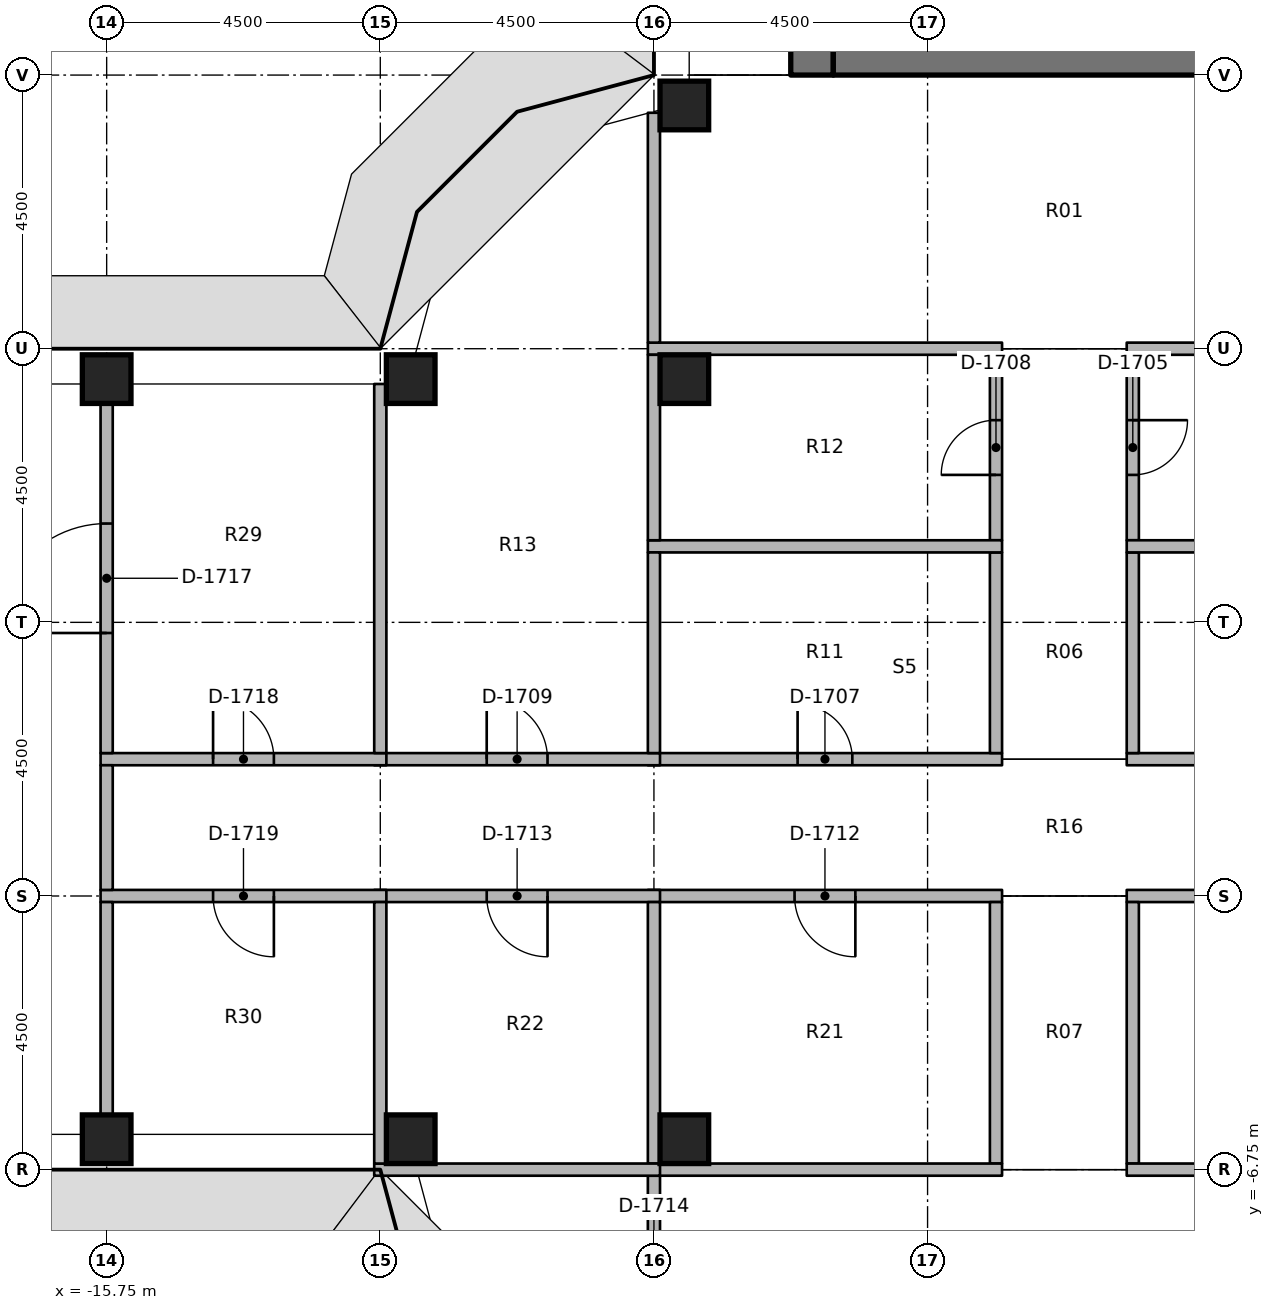
"""IFC4 building model, lengths in metres.
Left out: names, types, materials, properties, quantities, classifications, styles, units other than length and angle.
Written with IfcOpenShell. Run it as: python <this file> out.ifc"""

import sys

from ifc_helpers import new_model, si_unit, direction, frame, frame_2d, origin, origin_2d, place, context, subcontext, project, spatial, rectangle, extrude, element, fill, save


model = new_model("IFC4")
c1 = context("Model", 3, precision=1e-05, world=origin(), true_north=direction((0.0, 1.0)))
c2 = subcontext(c1, "Body", "Model", "MODEL_VIEW")
j1 = project(units=[si_unit("LENGTHUNIT", "METRE"), si_unit("PLANEANGLEUNIT", "RADIAN")], contexts=[c1])
p1 = place(None, origin())
s1 = spatial("IfcSite", under=j1, at=p1, CompositionType="ELEMENT")
p2 = place(p1, origin())
s2 = spatial("IfcBuilding", under=s1, at=p2, CompositionType="ELEMENT")
p3 = place(p2, frame((0.0, 0.0, 160.0)))
s3 = spatial("IfcBuildingStorey", under=s2, at=p3, CompositionType="ELEMENT", Elevation=160.0)
for number, where, z_axis, x_axis in (
    (1, (-15.75, -6.25, 0.0), (0.0, 0.0, 1.0), (1.0, 0.0, 0.0)),
    (2, (-15.75, 6.25, 0.0), (0.0, 0.0, 1.0), (1.0, 0.0, 0.0)),
    (3, (-10.75, -6.25, 0.0), (0.0, 0.0, 1.0), (1.0, 0.0, 0.0)),
    (4, (-10.75, 6.25, 0.0), (0.0, 0.0, 1.0), (1.0, 0.0, 0.0)),
    (5, (-6.25, -6.25, 0.0), (0.0, 0.0, 1.0), (1.0, 0.0, 0.0)),
    (6, (-6.25, 6.25, 0.0), (0.0, 0.0, 1.0), (1.0, 0.0, 0.0)),
    (7, (-6.25, 10.75, 0.0), (0.0, 0.0, 1.0), (1.0, 0.0, 0.0)),
):
    element("IfcColumn", number, at=place(p3, frame(where, z_axis=z_axis, x_axis=x_axis)), inside=s3, PredefinedType="COLUMN", context=c2, shape_type="SweptSolid", body=[
        extrude(rectangle(XDim=0.8, YDim=0.8, at=origin_2d()), origin(), (0.0, 0.0, 1.0), 3.65),
    ])
p4 = place(p3, frame((-4.15, 11.25, 0.0), z_axis=(0.0, 0.0, 1.0), x_axis=(0.0, 1.0, 0.0)))
e8 = element("IfcWall", 8, at=p4, inside=s3, PredefinedType="SHEAR", context=c2, shape_type="SweptSolid", body=[
    extrude(rectangle(XDim=15.0, YDim=0.7, at=frame_2d((7.5, 0.0))), origin(), (0.0, 0.0, 1.0), 3.8),
])
p5 = place(p4, frame((7.15, 0.0, 0.0)))
e9 = element("IfcOpeningElement", 9, at=p5, cuts=e8, PredefinedType="OPENING", context=c2, shape_type="SweptSolid", body=[
    extrude(rectangle(XDim=1.5, YDim=2.3, at=frame_2d((0.75, 1.15))), frame((0.0, 0.36, 0.0), z_axis=(0.0, -1.0, 0.0), x_axis=(1.0, 0.0, 0.0)), (0.0, 0.0, 1.0), 0.72),
])
p6 = place(p4, frame((13.9, 0.0, 0.0)))
e10 = element("IfcOpeningElement", 10, at=p6, cuts=e8, PredefinedType="OPENING", context=c2, shape_type="SweptSolid", body=[
    extrude(rectangle(XDim=0.9, YDim=2.1, at=frame_2d((0.45, 1.05))), frame((0.0, 0.36, 0.0), z_axis=(0.0, -1.0, 0.0), x_axis=(1.0, 0.0, 0.0)), (0.0, 0.0, 1.0), 0.72),
])
p7 = place(p4, frame((1.15, 0.0, 0.0)))
e11 = element("IfcOpeningElement", 11, at=p7, cuts=e8, PredefinedType="OPENING", context=c2, shape_type="SweptSolid", body=[
    extrude(rectangle(XDim=1.2, YDim=2.1, at=frame_2d((0.6, 1.05))), frame((0.0, 0.36, 0.0), z_axis=(0.0, -1.0, 0.0), x_axis=(1.0, 0.0, 0.0)), (0.0, 0.0, 1.0), 0.72),
])
p8 = place(p3, frame((-3.8, 11.6, 0.0), z_axis=(0.0, 0.0, 1.0), x_axis=(1.0, 0.0, 0.0)))
e12 = element("IfcWall", 12, at=p8, inside=s3, PredefinedType="SHEAR", context=c2, shape_type="SweptSolid", body=[
    extrude(rectangle(XDim=7.6, YDim=0.7, at=frame_2d((3.8, 0.0))), origin(), (0.0, 0.0, 1.0), 3.8),
])
p9 = place(p3, frame((1.025, 0.0, 0.0), z_axis=(0.0, 0.0, 1.0), x_axis=(1.0, 0.0, 0.0)))
e13 = element("IfcWall", 13, at=p9, inside=s3, PredefinedType="PARTITIONING", context=c2, shape_type="SweptSolid", body=[
    extrude(rectangle(XDim=5.825, YDim=0.2, at=frame_2d((2.913, 0.0))), origin(), (0.0, 0.0, 1.0), 2.75),
])
p10 = place(p9, frame((2.462, 0.0, 0.0)))
e14 = element("IfcOpeningElement", 14, at=p10, cuts=e13, PredefinedType="OPENING", context=c2, shape_type="SweptSolid", body=[
    extrude(rectangle(XDim=0.9, YDim=2.1, at=frame_2d((0.45, 1.05))), frame((0.0, 0.11, 0.0), z_axis=(0.0, -1.0, 0.0), x_axis=(1.0, 0.0, 0.0)), (0.0, 0.0, 1.0), 0.22),
])
p11 = place(p3, frame((-6.85, 0.0, 0.0), z_axis=(0.0, 0.0, 1.0), x_axis=(1.0, 0.0, 0.0)))
e15 = element("IfcWall", 15, at=p11, inside=s3, PredefinedType="PARTITIONING", context=c2, shape_type="SweptSolid", body=[
    extrude(rectangle(XDim=5.825, YDim=0.2, at=frame_2d((2.913, 0.0))), origin(), (0.0, 0.0, 1.0), 2.75),
])
p12 = place(p11, frame((2.462, 0.0, 0.0)))
e16 = element("IfcOpeningElement", 16, at=p12, cuts=e15, PredefinedType="OPENING", context=c2, shape_type="SweptSolid", body=[
    extrude(rectangle(XDim=0.9, YDim=2.1, at=frame_2d((0.45, 1.05))), frame((0.0, 0.11, 0.0), z_axis=(0.0, -1.0, 0.0), x_axis=(1.0, 0.0, 0.0)), (0.0, 0.0, 1.0), 0.22),
])
p13 = place(p3, frame((-11.35, 0.0, 0.0), z_axis=(0.0, 0.0, 1.0), x_axis=(1.0, 0.0, 0.0)))
e17 = element("IfcWall", 17, at=p13, inside=s3, PredefinedType="PARTITIONING", context=c2, shape_type="SweptSolid", body=[
    extrude(rectangle(XDim=4.7, YDim=0.2, at=frame_2d((2.35, 0.0))), origin(), (0.0, 0.0, 1.0), 2.75),
])
p14 = place(p13, frame((1.85, 0.0, 0.0)))
e18 = element("IfcOpeningElement", 18, at=p14, cuts=e17, PredefinedType="OPENING", context=c2, shape_type="SweptSolid", body=[
    extrude(rectangle(XDim=1.0, YDim=2.1, at=frame_2d((0.5, 1.05))), frame((0.0, 0.11, 0.0), z_axis=(0.0, -1.0, 0.0), x_axis=(1.0, 0.0, 0.0)), (0.0, 0.0, 1.0), 0.22),
])
p15 = place(p3, frame((6.85, -2.25, 0.0), z_axis=(0.0, 0.0, 1.0), x_axis=(-1.0, 0.0, 0.0)))
e19 = element("IfcWall", 19, at=p15, inside=s3, PredefinedType="PARTITIONING", context=c2, shape_type="SweptSolid", body=[
    extrude(rectangle(XDim=5.825, YDim=0.2, at=frame_2d((2.913, 0.0))), origin(), (0.0, 0.0, 1.0), 2.75),
])
p16 = place(p15, frame((2.413, 0.0, 0.0)))
e20 = element("IfcOpeningElement", 20, at=p16, cuts=e19, PredefinedType="OPENING", context=c2, shape_type="SweptSolid", body=[
    extrude(rectangle(XDim=1.0, YDim=2.1, at=frame_2d((0.5, 1.05))), frame((0.0, 0.11, 0.0), z_axis=(0.0, -1.0, 0.0), x_axis=(1.0, 0.0, 0.0)), (0.0, 0.0, 1.0), 0.22),
])
p17 = place(p3, frame((-1.025, -2.25, 0.0), z_axis=(0.0, 0.0, 1.0), x_axis=(-1.0, 0.0, 0.0)))
e21 = element("IfcWall", 21, at=p17, inside=s3, PredefinedType="PARTITIONING", context=c2, shape_type="SweptSolid", body=[
    extrude(rectangle(XDim=5.825, YDim=0.2, at=frame_2d((2.913, 0.0))), origin(), (0.0, 0.0, 1.0), 2.75),
])
p18 = place(p17, frame((2.413, 0.0, 0.0)))
e22 = element("IfcOpeningElement", 22, at=p18, cuts=e21, PredefinedType="OPENING", context=c2, shape_type="SweptSolid", body=[
    extrude(rectangle(XDim=1.0, YDim=2.1, at=frame_2d((0.5, 1.05))), frame((0.0, 0.11, 0.0), z_axis=(0.0, -1.0, 0.0), x_axis=(1.0, 0.0, 0.0)), (0.0, 0.0, 1.0), 0.22),
])
p19 = place(p3, frame((-6.65, -2.25, 0.0), z_axis=(0.0, 0.0, 1.0), x_axis=(-1.0, 0.0, 0.0)))
e23 = element("IfcWall", 23, at=p19, inside=s3, PredefinedType="PARTITIONING", context=c2, shape_type="SweptSolid", body=[
    extrude(rectangle(XDim=4.7, YDim=0.2, at=frame_2d((2.35, 0.0))), origin(), (0.0, 0.0, 1.0), 2.75),
])
p20 = place(p19, frame((1.85, 0.0, 0.0)))
e24 = element("IfcOpeningElement", 24, at=p20, cuts=e23, PredefinedType="OPENING", context=c2, shape_type="SweptSolid", body=[
    extrude(rectangle(XDim=1.0, YDim=2.1, at=frame_2d((0.5, 1.05))), frame((0.0, 0.11, 0.0), z_axis=(0.0, -1.0, 0.0), x_axis=(1.0, 0.0, 0.0)), (0.0, 0.0, 1.0), 0.22),
])
p21 = place(p3, frame((-15.85, 0.0, 0.0), z_axis=(0.0, 0.0, 1.0), x_axis=(1.0, 0.0, 0.0)))
e25 = element("IfcWall", 25, at=p21, inside=s3, PredefinedType="PARTITIONING", context=c2, shape_type="SweptSolid", body=[
    extrude(rectangle(XDim=4.7, YDim=0.2, at=frame_2d((2.35, 0.0))), origin(), (0.0, 0.0, 1.0), 2.75),
])
p22 = place(p21, frame((1.85, 0.0, 0.0)))
e26 = element("IfcOpeningElement", 26, at=p22, cuts=e25, PredefinedType="OPENING", context=c2, shape_type="SweptSolid", body=[
    extrude(rectangle(XDim=1.0, YDim=2.1, at=frame_2d((0.5, 1.05))), frame((0.0, 0.11, 0.0), z_axis=(0.0, -1.0, 0.0), x_axis=(1.0, 0.0, 0.0)), (0.0, 0.0, 1.0), 0.22),
])
p23 = place(p3, frame((-11.15, -2.25, 0.0), z_axis=(0.0, 0.0, 1.0), x_axis=(-1.0, 0.0, 0.0)))
e27 = element("IfcWall", 27, at=p23, inside=s3, PredefinedType="PARTITIONING", context=c2, shape_type="SweptSolid", body=[
    extrude(rectangle(XDim=4.7, YDim=0.2, at=frame_2d((2.35, 0.0))), origin(), (0.0, 0.0, 1.0), 2.75),
])
p24 = place(p23, frame((1.85, 0.0, 0.0)))
e28 = element("IfcOpeningElement", 28, at=p24, cuts=e27, PredefinedType="OPENING", context=c2, shape_type="SweptSolid", body=[
    extrude(rectangle(XDim=1.0, YDim=2.1, at=frame_2d((0.5, 1.05))), frame((0.0, 0.11, 0.0), z_axis=(0.0, -1.0, 0.0), x_axis=(1.0, 0.0, 0.0)), (0.0, 0.0, 1.0), 0.22),
])
p25 = place(p3, frame((-15.75, -2.15, 0.0), z_axis=(0.0, 0.0, 1.0), x_axis=(0.0, 1.0, 0.0)))
e29 = element("IfcWall", 29, at=p25, inside=s3, PredefinedType="PARTITIONING", context=c2, shape_type="SweptSolid", body=[
    extrude(rectangle(XDim=2.05, YDim=0.2, at=frame_2d((1.025, 0.0))), origin(), (0.0, 0.0, 1.0), 2.75),
])
p26 = place(p3, frame((1.125, 0.1, 0.0), z_axis=(0.0, 0.0, 1.0), x_axis=(0.0, 1.0, 0.0)))
e30 = element("IfcWall", 30, at=p26, inside=s3, PredefinedType="PARTITIONING", context=c2, shape_type="SweptSolid", body=[
    extrude(rectangle(XDim=3.3, YDim=0.2, at=frame_2d((1.65, 0.0))), origin(), (0.0, 0.0, 1.0), 2.75),
])
p27 = place(p3, frame((1.125, 6.65, 0.0), z_axis=(0.0, 0.0, 1.0), x_axis=(0.0, -1.0, 0.0)))
e31 = element("IfcWall", 31, at=p27, inside=s3, PredefinedType="PARTITIONING", context=c2, shape_type="SweptSolid", body=[
    extrude(rectangle(XDim=3.05, YDim=0.2, at=frame_2d((1.525, 0.0))), origin(), (0.0, 0.0, 1.0), 2.75),
])
p28 = place(p27, frame((1.075, 0.0, 0.0)))
e32 = element("IfcOpeningElement", 32, at=p28, cuts=e31, PredefinedType="OPENING", context=c2, shape_type="SweptSolid", body=[
    extrude(rectangle(XDim=0.9, YDim=2.1, at=frame_2d((0.45, 1.05))), frame((0.0, 0.11, 0.0), z_axis=(0.0, -1.0, 0.0), x_axis=(1.0, 0.0, 0.0)), (0.0, 0.0, 1.0), 0.22),
])
p29 = place(p3, frame((-1.125, 0.1, 0.0), z_axis=(0.0, 0.0, 1.0), x_axis=(0.0, 1.0, 0.0)))
e33 = element("IfcWall", 33, at=p29, inside=s3, PredefinedType="PARTITIONING", context=c2, shape_type="SweptSolid", body=[
    extrude(rectangle(XDim=3.3, YDim=0.2, at=frame_2d((1.65, 0.0))), origin(), (0.0, 0.0, 1.0), 2.75),
])
p30 = place(p3, frame((-1.125, 3.6, 0.0), z_axis=(0.0, 0.0, 1.0), x_axis=(0.0, 1.0, 0.0)))
e34 = element("IfcWall", 34, at=p30, inside=s3, PredefinedType="PARTITIONING", context=c2, shape_type="SweptSolid", body=[
    extrude(rectangle(XDim=3.05, YDim=0.2, at=frame_2d((1.525, 0.0))), origin(), (0.0, 0.0, 1.0), 2.75),
])
p31 = place(p30, frame((1.075, 0.0, 0.0)))
e35 = element("IfcOpeningElement", 35, at=p31, cuts=e34, PredefinedType="OPENING", context=c2, shape_type="SweptSolid", body=[
    extrude(rectangle(XDim=0.9, YDim=2.1, at=frame_2d((0.45, 1.05))), frame((0.0, 0.11, 0.0), z_axis=(0.0, -1.0, 0.0), x_axis=(1.0, 0.0, 0.0)), (0.0, 0.0, 1.0), 0.22),
])
for number, where, z_axis, x_axis in (
    (36, (1.125, -6.65, 0.0), (0.0, 0.0, 1.0), (0.0, 1.0, 0.0)),
    (37, (-1.125, -6.65, 0.0), (0.0, 0.0, 1.0), (0.0, 1.0, 0.0)),
):
    element("IfcWall", number, at=place(p3, frame(where, z_axis=z_axis, x_axis=x_axis)), inside=s3, PredefinedType="PARTITIONING", context=c2, shape_type="SweptSolid", body=[
        extrude(rectangle(XDim=4.3, YDim=0.2, at=frame_2d((2.15, 0.0))), origin(), (0.0, 0.0, 1.0), 2.75),
    ])
for number, where, z_axis, x_axis in (
    (38, (1.025, 6.75, 0.0), (0.0, 0.0, 1.0), (1.0, 0.0, 0.0)),
    (39, (-6.85, 6.75, 0.0), (0.0, 0.0, 1.0), (1.0, 0.0, 0.0)),
):
    element("IfcWall", number, at=place(p3, frame(where, z_axis=z_axis, x_axis=x_axis)), inside=s3, PredefinedType="PARTITIONING", context=c2, shape_type="SweptSolid", body=[
        extrude(rectangle(XDim=5.825, YDim=0.2, at=frame_2d((2.913, 0.0))), origin(), (0.0, 0.0, 1.0), 2.75),
    ])
p32 = place(p3, frame((-6.75, 6.85, 0.0), z_axis=(0.0, 0.0, 1.0), x_axis=(0.0, 1.0, 0.0)))
e40 = element("IfcWall", 40, at=p32, inside=s3, PredefinedType="PARTITIONING", context=c2, shape_type="SweptSolid", body=[
    extrude(rectangle(XDim=3.78, YDim=0.2, at=frame_2d((1.89, 0.0))), origin(), (0.0, 0.0, 1.0), 2.75),
])
for number, where, z_axis, x_axis in (
    (41, (1.025, -6.75, 0.0), (0.0, 0.0, 1.0), (1.0, 0.0, 0.0)),
    (42, (-6.85, -6.75, 0.0), (0.0, 0.0, 1.0), (1.0, 0.0, 0.0)),
):
    element("IfcWall", number, at=place(p3, frame(where, z_axis=z_axis, x_axis=x_axis)), inside=s3, PredefinedType="PARTITIONING", context=c2, shape_type="SweptSolid", body=[
        extrude(rectangle(XDim=5.825, YDim=0.2, at=frame_2d((2.913, 0.0))), origin(), (0.0, 0.0, 1.0), 2.75),
    ])
p33 = place(p3, frame((-6.75, -10.63, 0.0), z_axis=(0.0, 0.0, 1.0), x_axis=(0.0, 1.0, 0.0)))
e43 = element("IfcWall", 43, at=p33, inside=s3, PredefinedType="PARTITIONING", context=c2, shape_type="SweptSolid", body=[
    extrude(rectangle(XDim=3.78, YDim=0.2, at=frame_2d((1.89, 0.0))), origin(), (0.0, 0.0, 1.0), 2.75),
])
p34 = place(p33, frame((1.44, 0.0, 0.0)))
e44 = element("IfcOpeningElement", 44, at=p34, cuts=e43, PredefinedType="OPENING", context=c2, shape_type="SweptSolid", body=[
    extrude(rectangle(XDim=0.9, YDim=2.1, at=frame_2d((0.45, 1.05))), frame((0.0, 0.11, 0.0), z_axis=(0.0, -1.0, 0.0), x_axis=(1.0, 0.0, 0.0)), (0.0, 0.0, 1.0), 0.22),
])
for number, where, z_axis, x_axis in (
    (45, (1.025, 3.5, 0.0), (0.0, 0.0, 1.0), (1.0, 0.0, 0.0)),
    (46, (-6.85, 3.5, 0.0), (0.0, 0.0, 1.0), (1.0, 0.0, 0.0)),
):
    element("IfcWall", number, at=place(p3, frame(where, z_axis=z_axis, x_axis=x_axis)), inside=s3, PredefinedType="PARTITIONING", context=c2, shape_type="SweptSolid", body=[
        extrude(rectangle(XDim=5.825, YDim=0.2, at=frame_2d((2.913, 0.0))), origin(), (0.0, 0.0, 1.0), 2.75),
    ])
p35 = place(p3, frame((-6.75, 0.1, 0.0), z_axis=(0.0, 0.0, 1.0), x_axis=(0.0, 1.0, 0.0)))
e47 = element("IfcWall", 47, at=p35, inside=s3, PredefinedType="PARTITIONING", context=c2, shape_type="SweptSolid", body=[
    extrude(rectangle(XDim=3.3, YDim=0.2, at=frame_2d((1.65, 0.0))), origin(), (0.0, 0.0, 1.0), 2.75),
])
p36 = place(p3, frame((-6.75, 3.6, 0.0), z_axis=(0.0, 0.0, 1.0), x_axis=(0.0, 1.0, 0.0)))
e48 = element("IfcWall", 48, at=p36, inside=s3, PredefinedType="PARTITIONING", context=c2, shape_type="SweptSolid", body=[
    extrude(rectangle(XDim=3.05, YDim=0.2, at=frame_2d((1.525, 0.0))), origin(), (0.0, 0.0, 1.0), 2.75),
])
p37 = place(p3, frame((-11.25, 0.1, 0.0), z_axis=(0.0, 0.0, 1.0), x_axis=(0.0, 1.0, 0.0)))
e49 = element("IfcWall", 49, at=p37, inside=s3, PredefinedType="PARTITIONING", context=c2, shape_type="SweptSolid", body=[
    extrude(rectangle(XDim=6.07, YDim=0.2, at=frame_2d((3.035, 0.0))), origin(), (0.0, 0.0, 1.0), 2.75),
])
p38 = place(p3, frame((-6.75, -6.65, 0.0), z_axis=(0.0, 0.0, 1.0), x_axis=(0.0, 1.0, 0.0)))
e50 = element("IfcWall", 50, at=p38, inside=s3, PredefinedType="PARTITIONING", context=c2, shape_type="SweptSolid", body=[
    extrude(rectangle(XDim=4.3, YDim=0.2, at=frame_2d((2.15, 0.0))), origin(), (0.0, 0.0, 1.0), 2.75),
])
p39 = place(p3, frame((-11.35, -6.75, 0.0), z_axis=(0.0, 0.0, 1.0), x_axis=(1.0, 0.0, 0.0)))
e51 = element("IfcWall", 51, at=p39, inside=s3, PredefinedType="PARTITIONING", context=c2, shape_type="SweptSolid", body=[
    extrude(rectangle(XDim=4.7, YDim=0.2, at=frame_2d((2.35, 0.0))), origin(), (0.0, 0.0, 1.0), 2.75),
])
p40 = place(p3, frame((-11.25, -6.65, 0.0), z_axis=(0.0, 0.0, 1.0), x_axis=(0.0, 1.0, 0.0)))
e52 = element("IfcWall", 52, at=p40, inside=s3, PredefinedType="PARTITIONING", context=c2, shape_type="SweptSolid", body=[
    extrude(rectangle(XDim=4.3, YDim=0.2, at=frame_2d((2.15, 0.0))), origin(), (0.0, 0.0, 1.0), 2.75),
])
p41 = place(p3, frame((-15.75, 0.1, 0.0), z_axis=(0.0, 0.0, 1.0), x_axis=(0.0, 1.0, 0.0)))
e53 = element("IfcWall", 53, at=p41, inside=s3, PredefinedType="PARTITIONING", context=c2, shape_type="SweptSolid", body=[
    extrude(rectangle(XDim=5.75, YDim=0.2, at=frame_2d((2.875, 0.0))), origin(), (0.0, 0.0, 1.0), 2.75),
])
p42 = place(p41, frame((1.975, 0.0, 0.0)))
e54 = element("IfcOpeningElement", 54, at=p42, cuts=e53, PredefinedType="OPENING", context=c2, shape_type="SweptSolid", body=[
    extrude(rectangle(XDim=1.8, YDim=2.1, at=frame_2d((0.9, 1.05))), frame((0.0, 0.11, 0.0), z_axis=(0.0, -1.0, 0.0), x_axis=(1.0, 0.0, 0.0)), (0.0, 0.0, 1.0), 0.22),
])
p43 = place(p3, frame((-15.75, -5.85, 0.0), z_axis=(0.0, 0.0, 1.0), x_axis=(0.0, 1.0, 0.0)))
e55 = element("IfcWall", 55, at=p43, inside=s3, PredefinedType="PARTITIONING", context=c2, shape_type="SweptSolid", body=[
    extrude(rectangle(XDim=3.5, YDim=0.2, at=frame_2d((1.75, 0.0))), origin(), (0.0, 0.0, 1.0), 2.75),
])
p44 = place(p28, origin())
e56 = element("IfcDoor", 56, at=p44, inside=s3, OperationType="SINGLE_SWING_RIGHT", PredefinedType="DOOR", context=c2, shape_type="SweptSolid", body=[
    extrude(rectangle(XDim=0.9, YDim=2.1, at=frame_2d((0.45, 1.05))), frame((0.0, 0.025, 0.0), z_axis=(0.0, -1.0, 0.0), x_axis=(1.0, 0.0, 0.0)), (0.0, 0.0, 1.0), 0.05),
])
fill(e32, e56)
p45 = place(p12, origin())
e57 = element("IfcDoor", 57, at=p45, inside=s3, OperationType="SINGLE_SWING_RIGHT", PredefinedType="DOOR", context=c2, shape_type="SweptSolid", body=[
    extrude(rectangle(XDim=0.9, YDim=2.1, at=frame_2d((0.45, 1.05))), frame((0.0, 0.025, 0.0), z_axis=(0.0, -1.0, 0.0), x_axis=(1.0, 0.0, 0.0)), (0.0, 0.0, 1.0), 0.05),
])
fill(e16, e57)
p46 = place(p31, origin())
e58 = element("IfcDoor", 58, at=p46, inside=s3, OperationType="SINGLE_SWING_LEFT", PredefinedType="DOOR", context=c2, shape_type="SweptSolid", body=[
    extrude(rectangle(XDim=0.9, YDim=2.1, at=frame_2d((0.45, 1.05))), frame((0.0, 0.025, 0.0), z_axis=(0.0, -1.0, 0.0), x_axis=(1.0, 0.0, 0.0)), (0.0, 0.0, 1.0), 0.05),
])
fill(e35, e58)
p47 = place(p14, origin())
e59 = element("IfcDoor", 59, at=p47, inside=s3, OperationType="SINGLE_SWING_RIGHT", PredefinedType="DOOR", context=c2, shape_type="SweptSolid", body=[
    extrude(rectangle(XDim=1.0, YDim=2.1, at=frame_2d((0.5, 1.05))), frame((0.0, 0.025, 0.0), z_axis=(0.0, -1.0, 0.0), x_axis=(1.0, 0.0, 0.0)), (0.0, 0.0, 1.0), 0.05),
])
fill(e18, e59)
p48 = place(p18, origin())
e60 = element("IfcDoor", 60, at=p48, inside=s3, OperationType="SINGLE_SWING_RIGHT", PredefinedType="DOOR", context=c2, shape_type="SweptSolid", body=[
    extrude(rectangle(XDim=1.0, YDim=2.1, at=frame_2d((0.5, 1.05))), frame((0.0, 0.025, 0.0), z_axis=(0.0, -1.0, 0.0), x_axis=(1.0, 0.0, 0.0)), (0.0, 0.0, 1.0), 0.05),
])
fill(e22, e60)
p49 = place(p20, origin())
e61 = element("IfcDoor", 61, at=p49, inside=s3, OperationType="SINGLE_SWING_RIGHT", PredefinedType="DOOR", context=c2, shape_type="SweptSolid", body=[
    extrude(rectangle(XDim=1.0, YDim=2.1, at=frame_2d((0.5, 1.05))), frame((0.0, 0.025, 0.0), z_axis=(0.0, -1.0, 0.0), x_axis=(1.0, 0.0, 0.0)), (0.0, 0.0, 1.0), 0.05),
])
fill(e24, e61)
p50 = place(p42, origin())
e62 = element("IfcDoor", 62, at=p50, inside=s3, OperationType="DOUBLE_DOOR_SINGLE_SWING", PredefinedType="DOOR", context=c2, shape_type="SweptSolid", body=[
    extrude(rectangle(XDim=1.8, YDim=2.1, at=frame_2d((0.9, 1.05))), frame((0.0, 0.025, 0.0), z_axis=(0.0, -1.0, 0.0), x_axis=(1.0, 0.0, 0.0)), (0.0, 0.0, 1.0), 0.05),
])
fill(e54, e62)
p51 = place(p22, origin())
e63 = element("IfcDoor", 63, at=p51, inside=s3, OperationType="SINGLE_SWING_RIGHT", PredefinedType="DOOR", context=c2, shape_type="SweptSolid", body=[
    extrude(rectangle(XDim=1.0, YDim=2.1, at=frame_2d((0.5, 1.05))), frame((0.0, 0.025, 0.0), z_axis=(0.0, -1.0, 0.0), x_axis=(1.0, 0.0, 0.0)), (0.0, 0.0, 1.0), 0.05),
])
fill(e26, e63)
p52 = place(p24, origin())
e64 = element("IfcDoor", 64, at=p52, inside=s3, OperationType="SINGLE_SWING_RIGHT", PredefinedType="DOOR", context=c2, shape_type="SweptSolid", body=[
    extrude(rectangle(XDim=1.0, YDim=2.1, at=frame_2d((0.5, 1.05))), frame((0.0, 0.025, 0.0), z_axis=(0.0, -1.0, 0.0), x_axis=(1.0, 0.0, 0.0)), (0.0, 0.0, 1.0), 0.05),
])
fill(e28, e64)
save(model, sys.argv[1])
